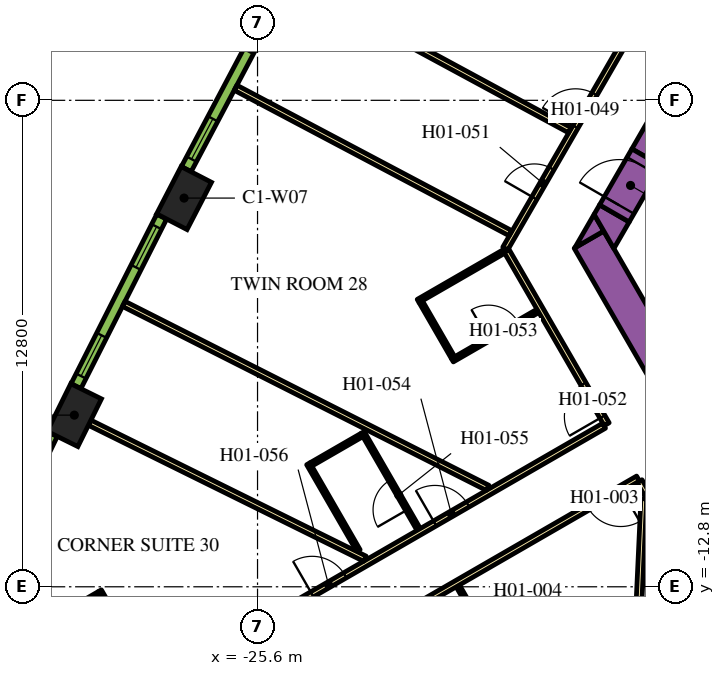
"""IFC4 building model, lengths in metres.
Left out: names, types, materials, properties, quantities, classifications, styles, units other than length and angle.
Written with IfcOpenShell. Run it as: python <this file> out.ifc"""

import sys

from ifc_helpers import new_model, si_unit, direction, frame, frame_2d, origin, origin_2d, place, context, subcontext, project, spatial, polyline, rectangle, outline, extrude, element, fill, save


model = new_model("IFC4")
c1 = context("Model", 3, precision=1e-05, world=origin(), true_north=direction((0.0, 1.0)))
c2 = subcontext(c1, "Body", "Model", "MODEL_VIEW")
j1 = project(units=[si_unit("LENGTHUNIT", "METRE"), si_unit("PLANEANGLEUNIT", "RADIAN")], contexts=[c1])
p1 = place(None, origin())
s1 = spatial("IfcSite", under=j1, at=p1, CompositionType="ELEMENT")
p2 = place(p1, origin())
s2 = spatial("IfcBuilding", under=s1, at=p2, CompositionType="ELEMENT")
p3 = place(p2, frame((0.0, 0.0, 35.4)))
s3 = spatial("IfcBuildingStorey", under=s2, at=p3, CompositionType="ELEMENT", Elevation=35.4)
for number, where, z_axis, x_axis in (
    (1, (-27.533, -2.572, 0.0), (0.0, 0.0, 1.0), (-0.459, -0.888, 0.0)),
    (2, (-30.421, -8.284, 0.0), (0.0, 0.0, 1.0), (-0.443, -0.897, 0.0)),
):
    element("IfcColumn", number, at=place(p3, frame(where, z_axis=z_axis, x_axis=x_axis)), inside=s3, PredefinedType="COLUMN", context=c2, shape_type="SweptSolid", body=[
        extrude(rectangle(XDim=1.4, YDim=0.9, at=origin_2d()), origin(), (0.0, 0.0, 1.0), 3.9),
    ])
p4 = place(p3, frame((-15.36, -1.503, 0.0), z_axis=(0.0, 0.0, 1.0), x_axis=(0.50000389221, 0.866023156604, 0.0)))
e3 = element("IfcWall", 3, at=p4, inside=s3, PredefinedType="SOLIDWALL", context=c2, shape_type="SweptSolid", body=[
    extrude(rectangle(XDim=21.0, YDim=0.9, at=frame_2d((10.5, 0.0))), origin(), (0.0, 0.0, 1.0), 3.9),
])
p5 = place(p3, frame((-12.134, -11.883, 0.0), z_axis=(0.0, 0.0, 1.0), x_axis=(-0.500005339912, 0.866022320763, 0.0)))
e4 = element("IfcWall", 4, at=p5, inside=s3, PredefinedType="SOLIDWALL", context=c2, shape_type="SweptSolid", body=[
    extrude(rectangle(XDim=9.488, YDim=0.9, at=frame_2d((4.744, 0.0))), origin(), (0.0, 0.0, 1.0), 3.9),
])
p6 = place(p3, origin())
e5 = element("IfcWall", 5, at=p6, inside=s3, PredefinedType="SOLIDWALL", context=c2, shape_type="SweptSolid", body=[
    extrude(outline(polyline([(-16.489, -3.44), (-17.251, -3.88), (-16.743, -3.0), (-16.489, -3.44)])), origin(), (0.0, 0.0, 1.0), 3.9),
])
e6 = element("IfcWall", 6, at=p6, inside=s3, PredefinedType="SOLIDWALL", context=c2, shape_type="SweptSolid", body=[
    extrude(outline(polyline([(-15.82, -3.201), (-16.223, -3.9), (-16.743, -3.0), (-16.599, -2.751), (-15.82, -3.201)])), origin(), (0.0, 0.0, 1.0), 3.9),
])
p7 = place(p3, frame((-16.209, -2.976, 0.0), z_axis=(0.0, 0.0, 1.0), x_axis=(0.499954529098, 0.86605165483, 0.0)))
e7 = element("IfcWall", 7, at=p7, inside=s3, PredefinedType="SOLIDWALL", context=c2, shape_type="SweptSolid", body=[
    extrude(rectangle(XDim=1.7, YDim=0.9, at=frame_2d((0.85, 0.0))), origin(), (0.0, 0.0, 1.0), 3.9),
])
p8 = place(p7, frame((0.25, 0.0, 0.0)))
e8 = element("IfcOpeningElement", 8, at=p8, cuts=e7, PredefinedType="OPENING", context=c2, shape_type="SweptSolid", body=[
    extrude(rectangle(XDim=1.2, YDim=2.1, at=frame_2d((0.6, 1.05))), frame((0.0, 0.46, 0.0), z_axis=(0.0, -1.0, 0.0), x_axis=(1.0, 0.0, 0.0)), (0.0, 0.0, 1.0), 0.92),
])
p9 = place(p3, frame((-19.081, -3.9, 0.0), z_axis=(0.0, 0.0, 1.0), x_axis=(0.499998313975, 0.866026377209, 0.0)))
e9 = element("IfcWall", 9, at=p9, inside=s3, PredefinedType="PARTITIONING", context=c2, shape_type="SweptSolid", body=[
    extrude(rectangle(XDim=25.766, YDim=0.15, at=frame_2d((12.883, 0.0))), origin(), (0.0, 0.0, 1.0), 2.75),
])
p10 = place(p9, frame((24.586, 0.0, 0.0)))
e10 = element("IfcOpeningElement", 10, at=p10, cuts=e9, PredefinedType="OPENING", context=c2, shape_type="SweptSolid", body=[
    extrude(rectangle(XDim=1.0, YDim=2.1, at=frame_2d((0.5, 1.05))), frame((0.0, 0.085, 0.0), z_axis=(0.0, -1.0, 0.0), x_axis=(1.0, 0.0, 0.0)), (0.0, 0.0, 1.0), 0.17),
])
p11 = place(p9, frame((16.196, 0.0, 0.0)))
e11 = element("IfcOpeningElement", 11, at=p11, cuts=e9, PredefinedType="OPENING", context=c2, shape_type="SweptSolid", body=[
    extrude(rectangle(XDim=1.0, YDim=2.1, at=frame_2d((0.5, 1.05))), frame((0.0, 0.085, 0.0), z_axis=(0.0, -1.0, 0.0), x_axis=(1.0, 0.0, 0.0)), (0.0, 0.0, 1.0), 0.17),
])
p12 = place(p9, frame((14.789, 0.0, 0.0)))
e12 = element("IfcOpeningElement", 12, at=p12, cuts=e9, PredefinedType="OPENING", context=c2, shape_type="SweptSolid", body=[
    extrude(rectangle(XDim=1.1, YDim=2.1, at=frame_2d((0.55, 1.05))), frame((0.0, 0.085, 0.0), z_axis=(0.0, -1.0, 0.0), x_axis=(1.0, 0.0, 0.0)), (0.0, 0.0, 1.0), 0.17),
])
p13 = place(p9, frame((3.698, 0.0, 0.0)))
e13 = element("IfcOpeningElement", 13, at=p13, cuts=e9, PredefinedType="OPENING", context=c2, shape_type="SweptSolid", body=[
    extrude(rectangle(XDim=1.0, YDim=2.1, at=frame_2d((0.5, 1.05))), frame((0.0, 0.085, 0.0), z_axis=(0.0, -1.0, 0.0), x_axis=(1.0, 0.0, 0.0)), (0.0, 0.0, 1.0), 0.17),
])
p14 = place(p9, frame((1.531, 0.0, 0.0)))
e14 = element("IfcOpeningElement", 14, at=p14, cuts=e9, PredefinedType="OPENING", context=c2, shape_type="SweptSolid", body=[
    extrude(rectangle(XDim=0.9, YDim=2.1, at=frame_2d((0.45, 1.05))), frame((0.0, 0.085, 0.0), z_axis=(0.0, -1.0, 0.0), x_axis=(1.0, 0.0, 0.0)), (0.0, 0.0, 1.0), 0.17),
])
p15 = place(p3, frame((-16.412, -8.523, 0.0), z_axis=(0.0, 0.0, 1.0), x_axis=(-0.500001929737, 0.866024289647, 0.0)))
e15 = element("IfcWall", 15, at=p15, inside=s3, PredefinedType="PARTITIONING", context=c2, shape_type="SweptSolid", body=[
    extrude(rectangle(XDim=5.268, YDim=0.15, at=frame_2d((2.634, 0.0))), origin(), (0.0, 0.0, 1.0), 2.75),
])
p16 = place(p15, frame((0.226, 0.0, 0.0)))
e16 = element("IfcOpeningElement", 16, at=p16, cuts=e15, PredefinedType="OPENING", context=c2, shape_type="SweptSolid", body=[
    extrude(rectangle(XDim=1.0, YDim=2.1, at=frame_2d((0.5, 1.05))), frame((0.0, 0.085, 0.0), z_axis=(0.0, -1.0, 0.0), x_axis=(1.0, 0.0, 0.0)), (0.0, 0.0, 1.0), 0.17),
])
p17 = place(p3, frame((-30.463, -16.635, 0.0), z_axis=(0.0, 0.0, 1.0), x_axis=(0.866022394896, 0.500005211512, 0.0)))
e17 = element("IfcWall", 17, at=p17, inside=s3, PredefinedType="PARTITIONING", context=c2, shape_type="SweptSolid", body=[
    extrude(rectangle(XDim=16.144, YDim=0.15, at=frame_2d((8.072, 0.0))), origin(), (0.0, 0.0, 1.0), 2.75),
])
p18 = place(p17, frame((11.004, 0.0, 0.0)))
e18 = element("IfcOpeningElement", 18, at=p18, cuts=e17, PredefinedType="OPENING", context=c2, shape_type="SweptSolid", body=[
    extrude(rectangle(XDim=1.0, YDim=2.1, at=frame_2d((0.5, 1.05))), frame((0.0, 0.085, 0.0), z_axis=(0.0, -1.0, 0.0), x_axis=(1.0, 0.0, 0.0)), (0.0, 0.0, 1.0), 0.17),
])
p19 = place(p17, frame((7.274, 0.0, 0.0)))
e19 = element("IfcOpeningElement", 19, at=p19, cuts=e17, PredefinedType="OPENING", context=c2, shape_type="SweptSolid", body=[
    extrude(rectangle(XDim=1.0, YDim=2.1, at=frame_2d((0.5, 1.05))), frame((0.0, 0.085, 0.0), z_axis=(0.0, -1.0, 0.0), x_axis=(1.0, 0.0, 0.0)), (0.0, 0.0, 1.0), 0.17),
])
p20 = place(p3, frame((-15.587, -9.952, 0.0), z_axis=(0.0, 0.0, 1.0), x_axis=(-0.866022197818, -0.500005552856, 0.0)))
e20 = element("IfcWall", 20, at=p20, inside=s3, PredefinedType="PARTITIONING", context=c2, shape_type="SweptSolid", body=[
    extrude(rectangle(XDim=16.224, YDim=0.15, at=frame_2d((8.112, 0.0))), origin(), (0.0, 0.0, 1.0), 2.75),
])
p21 = place(p20, frame((7.949, 0.0, 0.0)))
e21 = element("IfcOpeningElement", 21, at=p21, cuts=e20, PredefinedType="OPENING", context=c2, shape_type="SweptSolid", body=[
    extrude(rectangle(XDim=1.0, YDim=2.1, at=frame_2d((0.5, 1.05))), frame((0.0, 0.085, 0.0), z_axis=(0.0, -1.0, 0.0), x_axis=(1.0, 0.0, 0.0)), (0.0, 0.0, 1.0), 0.17),
])
p22 = place(p20, frame((0.525, 0.0, 0.0)))
e22 = element("IfcOpeningElement", 22, at=p22, cuts=e20, PredefinedType="OPENING", context=c2, shape_type="SweptSolid", body=[
    extrude(rectangle(XDim=1.0, YDim=2.1, at=frame_2d((0.5, 1.05))), frame((0.0, 0.085, 0.0), z_axis=(0.0, -1.0, 0.0), x_axis=(1.0, 0.0, 0.0)), (0.0, 0.0, 1.0), 0.17),
])
p23 = place(p3, frame((-12.918, -14.575, 0.0), z_axis=(0.0, 0.0, 1.0), x_axis=(-0.500009150678, 0.866020120573, 0.0)))
e23 = element("IfcWall", 23, at=p23, inside=s3, PredefinedType="PARTITIONING", context=c2, shape_type="SweptSolid", body=[
    extrude(rectangle(XDim=5.258, YDim=0.15, at=frame_2d((2.629, 0.0))), origin(), (0.0, 0.0, 1.0), 2.75),
])
p24 = place(p3, frame((-30.018, -8.483, 0.0), z_axis=(0.0, 0.0, 1.0), x_axis=(0.896544505264, -0.44295366584, 0.0)))
e24 = element("IfcWall", 24, at=p24, inside=s3, PredefinedType="PARTITIONING", context=c2, shape_type="SweptSolid", body=[
    extrude(rectangle(XDim=8.079, YDim=0.15, at=frame_2d((4.04, 0.0))), origin(), (0.0, 0.0, 1.0), 2.75),
])
p25 = place(p3, frame((-29.12, -5.356, 0.0), z_axis=(0.0, 0.0, 1.0), x_axis=(0.892401965553, -0.451241323327, 0.0)))
e25 = element("IfcWall", 25, at=p25, inside=s3, PredefinedType="PARTITIONING", context=c2, shape_type="SweptSolid", body=[
    extrude(rectangle(XDim=10.729, YDim=0.15, at=frame_2d((5.364, 0.0))), origin(), (0.0, 0.0, 1.0), 2.75),
])
p26 = place(p3, frame((-26.178, 0.331, 0.0), z_axis=(0.0, 0.0, 1.0), x_axis=(0.883908370409, -0.467660125221, 0.0)))
e26 = element("IfcWall", 26, at=p26, inside=s3, PredefinedType="PARTITIONING", context=c2, shape_type="SweptSolid", body=[
    extrude(rectangle(XDim=8.182, YDim=0.15, at=frame_2d((4.091, 0.0))), origin(), (0.0, 0.0, 1.0), 2.75),
])
p27 = place(p3, frame((-24.145, 2.871, 0.0), z_axis=(0.0, 0.0, 1.0), x_axis=(0.879551725039, -0.475803281809, 0.0)))
e27 = element("IfcWall", 27, at=p27, inside=s3, PredefinedType="PARTITIONING", context=c2, shape_type="SweptSolid", body=[
    extrude(rectangle(XDim=7.688, YDim=0.15, at=frame_2d((3.844, 0.0))), origin(), (0.0, 0.0, 1.0), 2.75),
])
p28 = place(p3, frame((-15.973, -22.109, 0.0), z_axis=(0.0, 0.0, 1.0), x_axis=(0.046191717129, 0.998932592955, 0.0)))
e28 = element("IfcWall", 28, at=p28, inside=s3, PredefinedType="PARTITIONING", context=c2, shape_type="SweptSolid", body=[
    extrude(rectangle(XDim=11.638, YDim=0.15, at=frame_2d((5.819, 0.0))), origin(), (0.0, 0.0, 1.0), 2.75),
])
p29 = place(p3, frame((-19.03, -15.029, 0.0), z_axis=(0.0, 0.0, 1.0), x_axis=(-0.500006934395, 0.866021400173, 0.0)))
e29 = element("IfcWall", 29, at=p29, inside=s3, PredefinedType="PARTITIONING", context=c2, shape_type="SweptSolid", body=[
    extrude(rectangle(XDim=2.6, YDim=0.1, at=frame_2d((1.3, 0.0))), origin(), (0.0, 0.0, 1.0), 2.75),
])
p30 = place(p29, frame((1.1, 0.0, 0.0)))
e30 = element("IfcOpeningElement", 30, at=p30, cuts=e29, PredefinedType="OPENING", context=c2, shape_type="SweptSolid", body=[
    extrude(rectangle(XDim=0.9, YDim=2.1, at=frame_2d((0.45, 1.05))), frame((0.0, 0.06, 0.0), z_axis=(0.0, -1.0, 0.0), x_axis=(1.0, 0.0, 0.0)), (0.0, 0.0, 1.0), 0.12),
])
p31 = place(p3, frame((-20.473, -6.84, 0.0), z_axis=(0.0, 0.0, 1.0), x_axis=(0.865997922154, 0.500047596559, 0.0)))
e31 = element("IfcWall", 31, at=p31, inside=s3, PredefinedType="PARTITIONING", context=c2, shape_type="SweptSolid", body=[
    extrude(rectangle(XDim=2.6, YDim=0.1, at=frame_2d((1.3, 0.0))), origin(), (0.0, 0.0, 1.0), 2.75),
])
p32 = place(p31, frame((1.1, 0.0, 0.0)))
e32 = element("IfcOpeningElement", 32, at=p32, cuts=e31, PredefinedType="OPENING", context=c2, shape_type="SweptSolid", body=[
    extrude(rectangle(XDim=0.9, YDim=2.1, at=frame_2d((0.45, 1.05))), frame((0.0, 0.06, 0.0), z_axis=(0.0, -1.0, 0.0), x_axis=(1.0, 0.0, 0.0)), (0.0, 0.0, 1.0), 0.12),
])
p33 = place(p3, frame((-20.455, -6.771, 0.0), z_axis=(0.0, 0.0, 1.0), x_axis=(-0.500062241894, 0.865989465428, 0.0)))
e33 = element("IfcWall", 33, at=p33, inside=s3, PredefinedType="PARTITIONING", context=c2, shape_type="SweptSolid", body=[
    extrude(rectangle(XDim=1.7, YDim=0.1, at=frame_2d((0.85, 0.0))), origin(), (0.0, 0.0, 1.0), 2.75),
])
p34 = place(p3, frame((-19.121, -3.981, 0.0), z_axis=(0.0, 0.0, 1.0), x_axis=(-0.866021400173, -0.500006934395, 0.0)))
e34 = element("IfcWall", 34, at=p34, inside=s3, PredefinedType="PARTITIONING", context=c2, shape_type="SweptSolid", body=[
    extrude(rectangle(XDim=2.6, YDim=0.1, at=frame_2d((1.3, 0.0))), origin(), (0.0, 0.0, 1.0), 2.75),
])
p35 = place(p3, frame((-21.36, -11.293, 0.0), z_axis=(0.0, 0.0, 1.0), x_axis=(-0.49997559174, 0.866039495442, 0.0)))
e35 = element("IfcWall", 35, at=p35, inside=s3, PredefinedType="PARTITIONING", context=c2, shape_type="SweptSolid", body=[
    extrude(rectangle(XDim=2.95, YDim=0.1, at=frame_2d((1.475, 0.0))), origin(), (0.0, 0.0, 1.0), 2.75),
])
p36 = place(p35, frame((0.6, 0.0, 0.0)))
e36 = element("IfcOpeningElement", 36, at=p36, cuts=e35, PredefinedType="OPENING", context=c2, shape_type="SweptSolid", body=[
    extrude(rectangle(XDim=0.9, YDim=2.1, at=frame_2d((0.45, 1.05))), frame((0.0, 0.06, 0.0), z_axis=(0.0, -1.0, 0.0), x_axis=(1.0, 0.0, 0.0)), (0.0, 0.0, 1.0), 0.12),
])
p37 = place(p3, frame((-22.853, -8.806, 0.0), z_axis=(0.0, 0.0, 1.0), x_axis=(-0.86601511528, -0.500017819788, 0.0)))
e37 = element("IfcWall", 37, at=p37, inside=s3, PredefinedType="PARTITIONING", context=c2, shape_type="SweptSolid", body=[
    extrude(rectangle(XDim=1.55, YDim=0.1, at=frame_2d((0.775, 0.0))), origin(), (0.0, 0.0, 1.0), 2.75),
])
p38 = place(p3, frame((-22.944, -11.85, 0.0), z_axis=(0.0, 0.0, 1.0), x_axis=(-0.499938597367, 0.866060851709, 0.0)))
e38 = element("IfcWall", 38, at=p38, inside=s3, PredefinedType="PARTITIONING", context=c2, shape_type="SweptSolid", body=[
    extrude(rectangle(XDim=2.64, YDim=0.1, at=frame_2d((1.32, 0.0))), origin(), (0.0, 0.0, 1.0), 2.75),
])
p39 = place(p3, frame((-28.352, -15.33, 0.0), z_axis=(0.0, 0.0, 1.0), x_axis=(-0.500049511043, 0.865996816683, 0.0)))
e39 = element("IfcWall", 39, at=p39, inside=s3, PredefinedType="PARTITIONING", context=c2, shape_type="SweptSolid", body=[
    extrude(rectangle(XDim=2.8, YDim=0.1, at=frame_2d((1.4, 0.0))), origin(), (0.0, 0.0, 1.0), 2.75),
])
p40 = place(p39, frame((0.6, 0.0, 0.0)))
e40 = element("IfcOpeningElement", 40, at=p40, cuts=e39, PredefinedType="OPENING", context=c2, shape_type="SweptSolid", body=[
    extrude(rectangle(XDim=0.9, YDim=2.1, at=frame_2d((0.45, 1.05))), frame((0.0, 0.06, 0.0), z_axis=(0.0, -1.0, 0.0), x_axis=(1.0, 0.0, 0.0)), (0.0, 0.0, 1.0), 0.12),
])
p41 = place(p3, frame((-29.771, -12.973, 0.0), z_axis=(0.0, 0.0, 1.0), x_axis=(-0.865980596518, -0.500077600433, 0.0)))
e41 = element("IfcWall", 41, at=p41, inside=s3, PredefinedType="PARTITIONING", context=c2, shape_type="SweptSolid", body=[
    extrude(rectangle(XDim=2.4, YDim=0.1, at=frame_2d((1.2, 0.0))), origin(), (0.0, 0.0, 1.0), 2.75),
])
p42 = place(p3, frame((-25.138, 2.608, 0.0), z_axis=(0.0, 0.0, 1.0), x_axis=(-0.467629620899, -0.883924509026, 0.0)))
e42 = element("IfcWall", 42, at=p42, inside=s3, PredefinedType="SOLIDWALL", context=c2, shape_type="SweptSolid", body=[
    extrude(rectangle(XDim=4.998, YDim=0.29, at=frame_2d((2.499, 0.0))), origin(), (0.0, 0.0, 1.0), 3.65),
])
p43 = place(p42, frame((0.297, 0.0, 0.9)))
e43 = element("IfcOpeningElement", 43, at=p43, cuts=e42, PredefinedType="OPENING", context=c2, shape_type="SweptSolid", body=[
    extrude(rectangle(XDim=1.2, YDim=2.15, at=frame_2d((0.6, 1.075))), frame((0.0, 0.155, 0.0), z_axis=(0.0, -1.0, 0.0), x_axis=(1.0, 0.0, 0.0)), (0.0, 0.0, 1.0), 0.31),
])
p44 = place(p42, frame((3.501, 0.0, 0.9)))
e44 = element("IfcOpeningElement", 44, at=p44, cuts=e42, PredefinedType="OPENING", context=c2, shape_type="SweptSolid", body=[
    extrude(rectangle(XDim=1.2, YDim=2.15, at=frame_2d((0.6, 1.075))), frame((0.0, 0.155, 0.0), z_axis=(0.0, -1.0, 0.0), x_axis=(1.0, 0.0, 0.0)), (0.0, 0.0, 1.0), 0.31),
])
p45 = place(p3, frame((-28.122, -3.06, 0.0), z_axis=(0.0, 0.0, 1.0), x_axis=(-0.451233929645, -0.892405704115, 0.0)))
e45 = element("IfcWall", 45, at=p45, inside=s3, PredefinedType="SOLIDWALL", context=c2, shape_type="SweptSolid", body=[
    extrude(rectangle(XDim=4.998, YDim=0.29, at=frame_2d((2.499, 0.0))), origin(), (0.0, 0.0, 1.0), 3.65),
])
p46 = place(p45, frame((0.297, 0.0, 0.9)))
e46 = element("IfcOpeningElement", 46, at=p46, cuts=e45, PredefinedType="OPENING", context=c2, shape_type="SweptSolid", body=[
    extrude(rectangle(XDim=1.2, YDim=2.15, at=frame_2d((0.6, 1.075))), frame((0.0, 0.155, 0.0), z_axis=(0.0, -1.0, 0.0), x_axis=(1.0, 0.0, 0.0)), (0.0, 0.0, 1.0), 0.31),
])
p47 = place(p45, frame((3.501, 0.0, 0.9)))
e47 = element("IfcOpeningElement", 47, at=p47, cuts=e45, PredefinedType="OPENING", context=c2, shape_type="SweptSolid", body=[
    extrude(rectangle(XDim=1.2, YDim=2.15, at=frame_2d((0.6, 1.075))), frame((0.0, 0.155, 0.0), z_axis=(0.0, -1.0, 0.0), x_axis=(1.0, 0.0, 0.0)), (0.0, 0.0, 1.0), 0.31),
])
p48 = place(p3, frame((-31.0, -8.782, 0.0), z_axis=(0.0, 0.0, 1.0), x_axis=(-0.434664499056, -0.900592456808, 0.0)))
e48 = element("IfcWall", 48, at=p48, inside=s3, PredefinedType="SOLIDWALL", context=c2, shape_type="SweptSolid", body=[
    extrude(rectangle(XDim=5.006, YDim=0.29, at=frame_2d((2.503, 0.0))), origin(), (0.0, 0.0, 1.0), 3.65),
])
p49 = place(p48, frame((0.31, 0.0, 0.9)))
e49 = element("IfcOpeningElement", 49, at=p49, cuts=e48, PredefinedType="OPENING", context=c2, shape_type="SweptSolid", body=[
    extrude(rectangle(XDim=1.2, YDim=2.15, at=frame_2d((0.6, 1.075))), frame((0.0, 0.155, 0.0), z_axis=(0.0, -1.0, 0.0), x_axis=(1.0, 0.0, 0.0)), (0.0, 0.0, 1.0), 0.31),
])
p50 = place(p48, frame((3.541, 0.0, 0.9)))
e50 = element("IfcOpeningElement", 50, at=p50, cuts=e48, PredefinedType="OPENING", context=c2, shape_type="SweptSolid", body=[
    extrude(rectangle(XDim=1.2, YDim=2.15, at=frame_2d((0.6, 1.075))), frame((0.0, 0.155, 0.0), z_axis=(0.0, -1.0, 0.0), x_axis=(1.0, 0.0, 0.0)), (0.0, 0.0, 1.0), 0.31),
])
p51 = place(p8, origin())
e51 = element("IfcDoor", 51, at=p51, inside=s3, OperationType="SINGLE_SWING_LEFT", PredefinedType="DOOR", context=c2, shape_type="SweptSolid", body=[
    extrude(rectangle(XDim=1.2, YDim=2.1, at=frame_2d((0.6, 1.05))), frame((0.0, 0.025, 0.0), z_axis=(0.0, -1.0, 0.0), x_axis=(1.0, 0.0, 0.0)), (0.0, 0.0, 1.0), 0.05),
])
fill(e8, e51)
p52 = place(p22, origin())
e52 = element("IfcDoor", 52, at=p52, inside=s3, OperationType="SINGLE_SWING_LEFT", PredefinedType="DOOR", context=c2, shape_type="SweptSolid", body=[
    extrude(rectangle(XDim=1.0, YDim=2.1, at=frame_2d((0.5, 1.05))), frame((0.0, 0.025, 0.0), z_axis=(0.0, -1.0, 0.0), x_axis=(1.0, 0.0, 0.0)), (0.0, 0.0, 1.0), 0.05),
])
fill(e22, e52)
p53 = place(p13, origin())
e53 = element("IfcDoor", 53, at=p53, inside=s3, OperationType="SINGLE_SWING_LEFT", PredefinedType="DOOR", context=c2, shape_type="SweptSolid", body=[
    extrude(rectangle(XDim=1.0, YDim=2.1, at=frame_2d((0.5, 1.05))), frame((0.0, 0.025, 0.0), z_axis=(0.0, -1.0, 0.0), x_axis=(1.0, 0.0, 0.0)), (0.0, 0.0, 1.0), 0.05),
])
fill(e13, e53)
p54 = place(p14, origin())
e54 = element("IfcDoor", 54, at=p54, inside=s3, OperationType="SINGLE_SWING_LEFT", PredefinedType="DOOR", context=c2, shape_type="SweptSolid", body=[
    extrude(rectangle(XDim=0.9, YDim=2.1, at=frame_2d((0.45, 1.05))), frame((0.0, 0.025, 0.0), z_axis=(0.0, -1.0, 0.0), x_axis=(1.0, 0.0, 0.0)), (0.0, 0.0, 1.0), 0.05),
])
fill(e14, e54)
p55 = place(p16, origin())
e55 = element("IfcDoor", 55, at=p55, inside=s3, OperationType="SINGLE_SWING_LEFT", PredefinedType="DOOR", context=c2, shape_type="SweptSolid", body=[
    extrude(rectangle(XDim=1.0, YDim=2.1, at=frame_2d((0.5, 1.05))), frame((0.0, 0.025, 0.0), z_axis=(0.0, -1.0, 0.0), x_axis=(1.0, 0.0, 0.0)), (0.0, 0.0, 1.0), 0.05),
])
fill(e16, e55)
p56 = place(p32, origin())
e56 = element("IfcDoor", 56, at=p56, inside=s3, OperationType="SINGLE_SWING_LEFT", PredefinedType="DOOR", context=c2, shape_type="SweptSolid", body=[
    extrude(rectangle(XDim=0.9, YDim=2.1, at=frame_2d((0.45, 1.05))), frame((0.0, 0.025, 0.0), z_axis=(0.0, -1.0, 0.0), x_axis=(1.0, 0.0, 0.0)), (0.0, 0.0, 1.0), 0.05),
])
fill(e32, e56)
p57 = place(p18, origin())
e57 = element("IfcDoor", 57, at=p57, inside=s3, OperationType="SINGLE_SWING_RIGHT", PredefinedType="DOOR", context=c2, shape_type="SweptSolid", body=[
    extrude(rectangle(XDim=1.0, YDim=2.1, at=frame_2d((0.5, 1.05))), frame((0.0, 0.025, 0.0), z_axis=(0.0, -1.0, 0.0), x_axis=(1.0, 0.0, 0.0)), (0.0, 0.0, 1.0), 0.05),
])
fill(e18, e57)
p58 = place(p36, origin())
e58 = element("IfcDoor", 58, at=p58, inside=s3, OperationType="SINGLE_SWING_LEFT", PredefinedType="DOOR", context=c2, shape_type="SweptSolid", body=[
    extrude(rectangle(XDim=0.9, YDim=2.1, at=frame_2d((0.45, 1.05))), frame((0.0, 0.025, 0.0), z_axis=(0.0, -1.0, 0.0), x_axis=(1.0, 0.0, 0.0)), (0.0, 0.0, 1.0), 0.05),
])
fill(e36, e58)
p59 = place(p19, origin())
e59 = element("IfcDoor", 59, at=p59, inside=s3, OperationType="SINGLE_SWING_RIGHT", PredefinedType="DOOR", context=c2, shape_type="SweptSolid", body=[
    extrude(rectangle(XDim=1.0, YDim=2.1, at=frame_2d((0.5, 1.05))), frame((0.0, 0.025, 0.0), z_axis=(0.0, -1.0, 0.0), x_axis=(1.0, 0.0, 0.0)), (0.0, 0.0, 1.0), 0.05),
])
fill(e19, e59)
p60 = place(p44, origin())
e60 = element("IfcWindow", 60, at=p60, inside=s3, PartitioningType="DOUBLE_PANEL_VERTICAL", PredefinedType="WINDOW", context=c2, shape_type="SweptSolid", body=[
    extrude(rectangle(XDim=1.2, YDim=2.15, at=frame_2d((0.6, 1.075))), frame((0.0, 0.015, 0.0), z_axis=(0.0, -1.0, 0.0), x_axis=(1.0, 0.0, 0.0)), (0.0, 0.0, 1.0), 0.06),
])
fill(e44, e60)
p61 = place(p46, origin())
e61 = element("IfcWindow", 61, at=p61, inside=s3, PartitioningType="DOUBLE_PANEL_VERTICAL", PredefinedType="WINDOW", context=c2, shape_type="SweptSolid", body=[
    extrude(rectangle(XDim=1.2, YDim=2.15, at=frame_2d((0.6, 1.075))), frame((0.0, 0.015, 0.0), z_axis=(0.0, -1.0, 0.0), x_axis=(1.0, 0.0, 0.0)), (0.0, 0.0, 1.0), 0.06),
])
fill(e46, e61)
p62 = place(p47, origin())
e62 = element("IfcWindow", 62, at=p62, inside=s3, PartitioningType="DOUBLE_PANEL_VERTICAL", PredefinedType="WINDOW", context=c2, shape_type="SweptSolid", body=[
    extrude(rectangle(XDim=1.2, YDim=2.15, at=frame_2d((0.6, 1.075))), frame((0.0, 0.015, 0.0), z_axis=(0.0, -1.0, 0.0), x_axis=(1.0, 0.0, 0.0)), (0.0, 0.0, 1.0), 0.06),
])
fill(e47, e62)
save(model, sys.argv[1])
